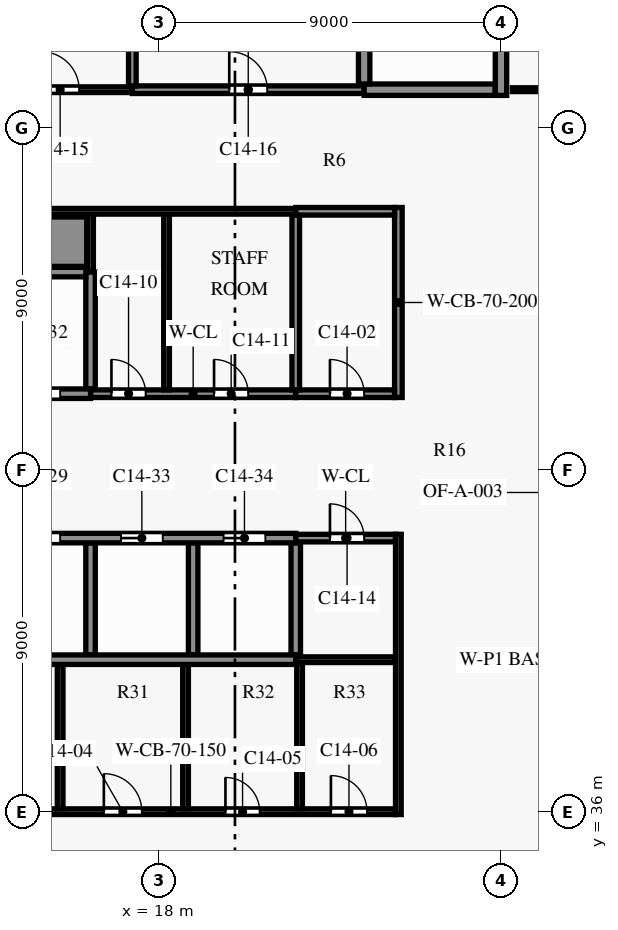
"""IFC4 building model, lengths in metres.
Left out: names, types, materials, properties, quantities, classifications, styles, units other than length and angle.
Written with IfcOpenShell. Run it as: python <this file> out.ifc"""

import sys

from ifc_helpers import new_model, si_unit, direction, frame, frame_2d, origin, place, context, subcontext, project, spatial, rectangle, extrude, element, fill, save


model = new_model("IFC4")
c1 = context("Model", 3, precision=1e-05, world=origin(), true_north=direction((0.0, 1.0)))
c2 = subcontext(c1, "Body", "Model", "MODEL_VIEW")
j1 = project(units=[si_unit("LENGTHUNIT", "METRE"), si_unit("PLANEANGLEUNIT", "RADIAN")], contexts=[c1])
p1 = place(None, origin())
s1 = spatial("IfcSite", under=j1, at=p1, CompositionType="ELEMENT")
p2 = place(p1, origin())
s2 = spatial("IfcBuilding", under=s1, at=p2, CompositionType="ELEMENT")
p3 = place(p2, frame((0.0, 0.0, 92.3)))
s3 = spatial("IfcBuildingStorey", under=s2, at=p3, CompositionType="ELEMENT", Elevation=92.3)
p4 = place(p3, frame((12.4, 36.0, 0.0), z_axis=(0.0, 0.0, 1.0), x_axis=(1.0, 0.0, 0.0)))
e1 = element("IfcWall", 1, at=p4, inside=s3, PredefinedType="SHEAR", context=c2, shape_type="SweptSolid", body=[
    extrude(rectangle(XDim=11.825, YDim=0.15, at=frame_2d((5.913, 0.0))), origin(), (0.0, 0.0, 1.0), 3.5),
])
p5 = place(p4, frame((1.05, 0.0, 0.0)))
e2 = element("IfcOpeningElement", 2, at=p5, cuts=e1, PredefinedType="OPENING", context=c2, shape_type="SweptSolid", body=[
    extrude(rectangle(XDim=0.9, YDim=2.1, at=frame_2d((0.45, 1.05))), frame((0.0, 0.085, 0.0), z_axis=(0.0, -1.0, 0.0), x_axis=(1.0, 0.0, 0.0)), (0.0, 0.0, 1.0), 0.17),
])
p6 = place(p4, frame((4.15, 0.0, 0.0)))
e3 = element("IfcOpeningElement", 3, at=p6, cuts=e1, PredefinedType="OPENING", context=c2, shape_type="SweptSolid", body=[
    extrude(rectangle(XDim=1.0, YDim=2.1, at=frame_2d((0.5, 1.05))), frame((0.0, 0.085, 0.0), z_axis=(0.0, -1.0, 0.0), x_axis=(1.0, 0.0, 0.0)), (0.0, 0.0, 1.0), 0.17),
])
p7 = place(p4, frame((7.35, 0.0, 0.0)))
e4 = element("IfcOpeningElement", 4, at=p7, cuts=e1, PredefinedType="OPENING", context=c2, shape_type="SweptSolid", body=[
    extrude(rectangle(XDim=0.9, YDim=2.1, at=frame_2d((0.45, 1.05))), frame((0.0, 0.085, 0.0), z_axis=(0.0, -1.0, 0.0), x_axis=(1.0, 0.0, 0.0)), (0.0, 0.0, 1.0), 0.17),
])
p8 = place(p4, frame((10.125, 0.0, 0.0)))
e5 = element("IfcOpeningElement", 5, at=p8, cuts=e1, PredefinedType="OPENING", context=c2, shape_type="SweptSolid", body=[
    extrude(rectangle(XDim=0.95, YDim=2.1, at=frame_2d((0.475, 1.05))), frame((0.0, 0.085, 0.0), z_axis=(0.0, -1.0, 0.0), x_axis=(1.0, 0.0, 0.0)), (0.0, 0.0, 1.0), 0.17),
])
p9 = place(p3, frame((21.6, 40.0, 0.0), z_axis=(0.0, 0.0, 1.0), x_axis=(1.0, 0.0, 0.0)))
e6 = element("IfcWall", 6, at=p9, inside=s3, PredefinedType="PARTITIONING", context=c2, shape_type="SweptSolid", body=[
    extrude(rectangle(XDim=2.625, YDim=0.15, at=frame_2d((1.312, 0.0))), origin(), (0.0, 0.0, 1.0), 3.5),
])
p10 = place(p3, frame((8.1, 40.0, 0.0), z_axis=(0.0, 0.0, 1.0), x_axis=(1.0, 0.0, 0.0)))
e7 = element("IfcWall", 7, at=p10, inside=s3, PredefinedType="SHEAR", context=c2, shape_type="SweptSolid", body=[
    extrude(rectangle(XDim=13.5, YDim=0.25, at=frame_2d((6.75, 0.0))), origin(), (0.0, 0.0, 1.0), 3.5),
])
p11 = place(p3, frame((21.6, 43.2, 0.0), z_axis=(0.0, 0.0, 1.0), x_axis=(1.0, 0.0, 0.0)))
e8 = element("IfcWall", 8, at=p11, inside=s3, PredefinedType="PARTITIONING", context=c2, shape_type="SweptSolid", body=[
    extrude(rectangle(XDim=2.625, YDim=0.2, at=frame_2d((1.312, 0.0))), origin(), (0.0, 0.0, 1.0), 3.5),
])
p12 = place(p11, frame((0.9, 0.0, 0.0)))
e9 = element("IfcOpeningElement", 9, at=p12, cuts=e8, PredefinedType="OPENING", context=c2, shape_type="SweptSolid", body=[
    extrude(rectangle(XDim=0.9, YDim=2.1, at=frame_2d((0.45, 1.05))), frame((0.0, 0.11, 0.0), z_axis=(0.0, -1.0, 0.0), x_axis=(1.0, 0.0, 0.0)), (0.0, 0.0, 1.0), 0.22),
])
p13 = place(p3, frame((8.1, 43.2, 0.0), z_axis=(0.0, 0.0, 1.0), x_axis=(1.0, 0.0, 0.0)))
e10 = element("IfcWall", 10, at=p13, inside=s3, PredefinedType="SHEAR", context=c2, shape_type="SweptSolid", body=[
    extrude(rectangle(XDim=13.5, YDim=0.25, at=frame_2d((6.75, 0.0))), origin(), (0.0, 0.0, 1.0), 3.5),
])
p14 = place(p13, frame((0.8, 0.0, 0.0)))
e11 = element("IfcOpeningElement", 11, at=p14, cuts=e10, PredefinedType="OPENING", context=c2, shape_type="SweptSolid", body=[
    extrude(rectangle(XDim=1.1, YDim=2.1, at=frame_2d((0.55, 1.05))), frame((0.0, 0.135, 0.0), z_axis=(0.0, -1.0, 0.0), x_axis=(1.0, 0.0, 0.0)), (0.0, 0.0, 1.0), 0.27),
])
p15 = place(p13, frame((3.5, 0.0, 0.0)))
e12 = element("IfcOpeningElement", 12, at=p15, cuts=e10, PredefinedType="OPENING", context=c2, shape_type="SweptSolid", body=[
    extrude(rectangle(XDim=1.1, YDim=2.1, at=frame_2d((0.55, 1.05))), frame((0.0, 0.135, 0.0), z_axis=(0.0, -1.0, 0.0), x_axis=(1.0, 0.0, 0.0)), (0.0, 0.0, 1.0), 0.27),
])
p16 = place(p13, frame((6.2, 0.0, 0.0)))
e13 = element("IfcOpeningElement", 13, at=p16, cuts=e10, PredefinedType="OPENING", context=c2, shape_type="SweptSolid", body=[
    extrude(rectangle(XDim=1.1, YDim=2.1, at=frame_2d((0.55, 1.05))), frame((0.0, 0.135, 0.0), z_axis=(0.0, -1.0, 0.0), x_axis=(1.0, 0.0, 0.0)), (0.0, 0.0, 1.0), 0.27),
])
p17 = place(p13, frame((8.9, 0.0, 0.0)))
e14 = element("IfcOpeningElement", 14, at=p17, cuts=e10, PredefinedType="OPENING", context=c2, shape_type="SweptSolid", body=[
    extrude(rectangle(XDim=1.1, YDim=2.1, at=frame_2d((0.55, 1.05))), frame((0.0, 0.135, 0.0), z_axis=(0.0, -1.0, 0.0), x_axis=(1.0, 0.0, 0.0)), (0.0, 0.0, 1.0), 0.27),
])
p18 = place(p13, frame((11.6, 0.0, 0.0)))
e15 = element("IfcOpeningElement", 15, at=p18, cuts=e10, PredefinedType="OPENING", context=c2, shape_type="SweptSolid", body=[
    extrude(rectangle(XDim=1.1, YDim=2.1, at=frame_2d((0.55, 1.05))), frame((0.0, 0.135, 0.0), z_axis=(0.0, -1.0, 0.0), x_axis=(1.0, 0.0, 0.0)), (0.0, 0.0, 1.0), 0.27),
])
p19 = place(p3, frame((16.2, 47.0, 0.0), z_axis=(0.0, 0.0, 1.0), x_axis=(1.0, 0.0, 0.0)))
e16 = element("IfcWall", 16, at=p19, inside=s3, PredefinedType="PARTITIONING", context=c2, shape_type="SweptSolid", body=[
    extrude(rectangle(XDim=5.4, YDim=0.2, at=frame_2d((2.7, 0.0))), origin(), (0.0, 0.0, 1.0), 3.5),
])
p20 = place(p19, frame((0.55, 0.0, 0.0)))
e17 = element("IfcOpeningElement", 17, at=p20, cuts=e16, PredefinedType="OPENING", context=c2, shape_type="SweptSolid", body=[
    extrude(rectangle(XDim=0.9, YDim=2.1, at=frame_2d((0.45, 1.05))), frame((0.0, 0.11, 0.0), z_axis=(0.0, -1.0, 0.0), x_axis=(1.0, 0.0, 0.0)), (0.0, 0.0, 1.0), 0.22),
])
p21 = place(p19, frame((3.25, 0.0, 0.0)))
e18 = element("IfcOpeningElement", 18, at=p21, cuts=e16, PredefinedType="OPENING", context=c2, shape_type="SweptSolid", body=[
    extrude(rectangle(XDim=0.9, YDim=2.1, at=frame_2d((0.45, 1.05))), frame((0.0, 0.11, 0.0), z_axis=(0.0, -1.0, 0.0), x_axis=(1.0, 0.0, 0.0)), (0.0, 0.0, 1.0), 0.22),
])
p22 = place(p3, frame((21.6, 47.0, 0.0), z_axis=(0.0, 0.0, 1.0), x_axis=(1.0, 0.0, 0.0)))
e19 = element("IfcWall", 19, at=p22, inside=s3, PredefinedType="PARTITIONING", context=c2, shape_type="SweptSolid", body=[
    extrude(rectangle(XDim=2.6, YDim=0.2, at=frame_2d((1.3, 0.0))), origin(), (0.0, 0.0, 1.0), 3.5),
])
p23 = place(p22, frame((0.9, 0.0, 0.0)))
e20 = element("IfcOpeningElement", 20, at=p23, cuts=e19, PredefinedType="OPENING", context=c2, shape_type="SweptSolid", body=[
    extrude(rectangle(XDim=0.9, YDim=2.1, at=frame_2d((0.45, 1.05))), frame((0.0, 0.11, 0.0), z_axis=(0.0, -1.0, 0.0), x_axis=(1.0, 0.0, 0.0)), (0.0, 0.0, 1.0), 0.22),
])
p24 = place(p3, frame((8.1, 47.0, 0.0), z_axis=(0.0, 0.0, 1.0), x_axis=(1.0, 0.0, 0.0)))
e21 = element("IfcWall", 21, at=p24, inside=s3, PredefinedType="SHEAR", context=c2, shape_type="SweptSolid", body=[
    extrude(rectangle(XDim=8.1, YDim=0.25, at=frame_2d((4.05, 0.0))), origin(), (0.0, 0.0, 1.0), 3.5),
])
p25 = place(p24, frame((0.8, 0.0, 0.0)))
e22 = element("IfcOpeningElement", 22, at=p25, cuts=e21, PredefinedType="OPENING", context=c2, shape_type="SweptSolid", body=[
    extrude(rectangle(XDim=1.1, YDim=2.1, at=frame_2d((0.55, 1.05))), frame((0.0, 0.135, 0.0), z_axis=(0.0, -1.0, 0.0), x_axis=(1.0, 0.0, 0.0)), (0.0, 0.0, 1.0), 0.27),
])
p26 = place(p24, frame((3.5, 0.0, 0.0)))
e23 = element("IfcOpeningElement", 23, at=p26, cuts=e21, PredefinedType="OPENING", context=c2, shape_type="SweptSolid", body=[
    extrude(rectangle(XDim=1.1, YDim=2.1, at=frame_2d((0.55, 1.05))), frame((0.0, 0.135, 0.0), z_axis=(0.0, -1.0, 0.0), x_axis=(1.0, 0.0, 0.0)), (0.0, 0.0, 1.0), 0.27),
])
p27 = place(p24, frame((6.2, 0.0, 0.0)))
e24 = element("IfcOpeningElement", 24, at=p27, cuts=e21, PredefinedType="OPENING", context=c2, shape_type="SweptSolid", body=[
    extrude(rectangle(XDim=1.1, YDim=2.1, at=frame_2d((0.55, 1.05))), frame((0.0, 0.135, 0.0), z_axis=(0.0, -1.0, 0.0), x_axis=(1.0, 0.0, 0.0)), (0.0, 0.0, 1.0), 0.27),
])
p28 = place(p3, frame((8.1, 50.2, 0.0), z_axis=(0.0, 0.0, 1.0), x_axis=(1.0, 0.0, 0.0)))
e25 = element("IfcWall", 25, at=p28, inside=s3, PredefinedType="SHEAR", context=c2, shape_type="SweptSolid", body=[
    extrude(rectangle(XDim=7.975, YDim=0.25, at=frame_2d((3.987, 0.0))), origin(), (0.0, 0.0, 1.0), 3.5),
])
p29 = place(p3, frame((-0.125, 51.0, 0.0), z_axis=(0.0, 0.0, 1.0), x_axis=(1.0, 0.0, 0.0)))
e26 = element("IfcWall", 26, at=p29, inside=s3, PredefinedType="SHEAR", context=c2, shape_type="SweptSolid", body=[
    extrude(rectangle(XDim=16.225, YDim=1.3, at=frame_2d((8.113, 0.0))), origin(), (0.0, 0.0, 1.0), 3.5),
])
p30 = place(p3, frame((8.1, 51.8, 0.0), z_axis=(0.0, 0.0, 1.0), x_axis=(1.0, 0.0, 0.0)))
e27 = element("IfcWall", 27, at=p30, inside=s3, PredefinedType="PARTITIONING", context=c2, shape_type="SweptSolid", body=[
    extrude(rectangle(XDim=13.5, YDim=0.15, at=frame_2d((6.75, 0.0))), origin(), (0.0, 0.0, 1.0), 3.5),
])
p31 = place(p3, frame((21.6, 51.8, 0.0), z_axis=(0.0, 0.0, 1.0), x_axis=(1.0, 0.0, 0.0)))
e28 = element("IfcWall", 28, at=p31, inside=s3, PredefinedType="PARTITIONING", context=c2, shape_type="SweptSolid", body=[
    extrude(rectangle(XDim=2.6, YDim=0.2, at=frame_2d((1.3, 0.0))), origin(), (0.0, 0.0, 1.0), 3.5),
])
p32 = place(p3, frame((13.5, 55.0, 0.0), z_axis=(0.0, 0.0, 1.0), x_axis=(1.0, 0.0, 0.0)))
e29 = element("IfcWall", 29, at=p32, inside=s3, PredefinedType="PARTITIONING", context=c2, shape_type="SweptSolid", body=[
    extrude(rectangle(XDim=3.8, YDim=0.15, at=frame_2d((1.9, 0.0))), origin(), (0.0, 0.0, 1.0), 3.5),
])
p33 = place(p32, frame((1.4, 0.0, 0.0)))
e30 = element("IfcOpeningElement", 30, at=p33, cuts=e29, PredefinedType="OPENING", context=c2, shape_type="SweptSolid", body=[
    extrude(rectangle(XDim=1.0, YDim=2.1, at=frame_2d((0.5, 1.05))), frame((0.0, 0.085, 0.0), z_axis=(0.0, -1.0, 0.0), x_axis=(1.0, 0.0, 0.0)), (0.0, 0.0, 1.0), 0.17),
])
p34 = place(p3, frame((17.3, 55.0, 0.0), z_axis=(0.0, 0.0, 1.0), x_axis=(1.0, 0.0, 0.0)))
e31 = element("IfcWall", 31, at=p34, inside=s3, PredefinedType="PARTITIONING", context=c2, shape_type="SweptSolid", body=[
    extrude(rectangle(XDim=6.1, YDim=0.2, at=frame_2d((3.05, 0.0))), origin(), (0.0, 0.0, 1.0), 3.5),
])
p35 = place(p34, frame((2.55, 0.0, 0.0)))
e32 = element("IfcOpeningElement", 32, at=p35, cuts=e31, PredefinedType="OPENING", context=c2, shape_type="SweptSolid", body=[
    extrude(rectangle(XDim=1.0, YDim=2.1, at=frame_2d((0.5, 1.05))), frame((0.0, 0.11, 0.0), z_axis=(0.0, -1.0, 0.0), x_axis=(1.0, 0.0, 0.0)), (0.0, 0.0, 1.0), 0.22),
])
p36 = place(p3, frame((23.4, 55.0, 0.0), z_axis=(0.0, 0.0, 1.0), x_axis=(1.0, 0.0, 0.0)))
e33 = element("IfcWall", 33, at=p36, inside=s3, PredefinedType="SHEAR", context=c2, shape_type="SweptSolid", body=[
    extrude(rectangle(XDim=3.45, YDim=0.3, at=frame_2d((1.725, 0.0))), origin(), (0.0, 0.0, 1.0), 3.5),
])
p37 = place(p3, frame((15.4, 36.075, 0.0), z_axis=(0.0, 0.0, 1.0), x_axis=(0.0, 1.0, 0.0)))
e34 = element("IfcWall", 34, at=p37, inside=s3, PredefinedType="PARTITIONING", context=c2, shape_type="SweptSolid", body=[
    extrude(rectangle(XDim=3.8, YDim=0.15, at=frame_2d((1.9, 0.0))), origin(), (0.0, 0.0, 1.0), 3.5),
])
p38 = place(p3, frame((16.2, 50.2, 0.0), z_axis=(0.0, 0.0, 1.0), x_axis=(0.0, 1.0, 0.0)))
e35 = element("IfcWall", 35, at=p38, inside=s3, PredefinedType="PARTITIONING", context=c2, shape_type="SweptSolid", body=[
    extrude(rectangle(XDim=1.525, YDim=0.15, at=frame_2d((0.763, 0.0))), origin(), (0.0, 0.0, 1.0), 3.5),
])
p39 = place(p3, frame((16.2, 40.125, 0.0), z_axis=(0.0, 0.0, 1.0), x_axis=(0.0, 1.0, 0.0)))
e36 = element("IfcWall", 36, at=p39, inside=s3, PredefinedType="SHEAR", context=c2, shape_type="SweptSolid", body=[
    extrude(rectangle(XDim=2.95, YDim=0.25, at=frame_2d((1.475, 0.0))), origin(), (0.0, 0.0, 1.0), 3.5),
])
p40 = place(p3, frame((16.2, 47.125, 0.0), z_axis=(0.0, 0.0, 1.0), x_axis=(0.0, 1.0, 0.0)))
e37 = element("IfcWall", 37, at=p40, inside=s3, PredefinedType="SHEAR", context=c2, shape_type="SweptSolid", body=[
    extrude(rectangle(XDim=3.075, YDim=0.25, at=frame_2d((1.538, 0.0))), origin(), (0.0, 0.0, 1.0), 3.5),
])
p41 = place(p3, frame((17.3, 55.1, 0.0), z_axis=(0.0, 0.0, 1.0), x_axis=(0.0, 1.0, 0.0)))
e38 = element("IfcWall", 38, at=p41, inside=s3, PredefinedType="PARTITIONING", context=c2, shape_type="SweptSolid", body=[
    extrude(rectangle(XDim=7.05, YDim=0.2, at=frame_2d((3.525, 0.0))), origin(), (0.0, 0.0, 1.0), 3.5),
])
p42 = place(p3, frame((18.2, 47.1, 0.0), z_axis=(0.0, 0.0, 1.0), x_axis=(0.0, 1.0, 0.0)))
e39 = element("IfcWall", 39, at=p42, inside=s3, PredefinedType="PARTITIONING", context=c2, shape_type="SweptSolid", body=[
    extrude(rectangle(XDim=4.625, YDim=0.15, at=frame_2d((2.312, 0.0))), origin(), (0.0, 0.0, 1.0), 3.5),
])
p43 = place(p3, frame((18.7, 36.075, 0.0), z_axis=(0.0, 0.0, 1.0), x_axis=(0.0, 1.0, 0.0)))
e40 = element("IfcWall", 40, at=p43, inside=s3, PredefinedType="PARTITIONING", context=c2, shape_type="SweptSolid", body=[
    extrude(rectangle(XDim=3.8, YDim=0.15, at=frame_2d((1.9, 0.0))), origin(), (0.0, 0.0, 1.0), 3.5),
])
p44 = place(p3, frame((18.9, 40.125, 0.0), z_axis=(0.0, 0.0, 1.0), x_axis=(0.0, 1.0, 0.0)))
e41 = element("IfcWall", 41, at=p44, inside=s3, PredefinedType="SHEAR", context=c2, shape_type="SweptSolid", body=[
    extrude(rectangle(XDim=2.95, YDim=0.25, at=frame_2d((1.475, 0.0))), origin(), (0.0, 0.0, 1.0), 3.5),
])
p45 = place(p3, frame((21.6, 47.1, 0.0), z_axis=(0.0, 0.0, 1.0), x_axis=(0.0, 1.0, 0.0)))
e42 = element("IfcWall", 42, at=p45, inside=s3, PredefinedType="PARTITIONING", context=c2, shape_type="SweptSolid", body=[
    extrude(rectangle(XDim=4.6, YDim=0.2, at=frame_2d((2.3, 0.0))), origin(), (0.0, 0.0, 1.0), 3.5),
])
p46 = place(p3, frame((21.6, 40.125, 0.0), z_axis=(0.0, 0.0, 1.0), x_axis=(0.0, 1.0, 0.0)))
e43 = element("IfcWall", 43, at=p46, inside=s3, PredefinedType="SHEAR", context=c2, shape_type="SweptSolid", body=[
    extrude(rectangle(XDim=2.95, YDim=0.25, at=frame_2d((1.475, 0.0))), origin(), (0.0, 0.0, 1.0), 3.5),
])
p47 = place(p3, frame((21.7, 36.075, 0.0), z_axis=(0.0, 0.0, 1.0), x_axis=(0.0, 1.0, 0.0)))
e44 = element("IfcWall", 44, at=p47, inside=s3, PredefinedType="PARTITIONING", context=c2, shape_type="SweptSolid", body=[
    extrude(rectangle(XDim=3.85, YDim=0.15, at=frame_2d((1.925, 0.0))), origin(), (0.0, 0.0, 1.0), 3.5),
])
p48 = place(p3, frame((23.4, 55.15, 0.0), z_axis=(0.0, 0.0, 1.0), x_axis=(0.0, 1.0, 0.0)))
e45 = element("IfcWall", 45, at=p48, inside=s3, PredefinedType="SHEAR", context=c2, shape_type="SweptSolid", body=[
    extrude(rectangle(XDim=8.0, YDim=0.3, at=frame_2d((4.0, 0.0))), origin(), (0.0, 0.0, 1.0), 3.5),
])
p49 = place(p3, frame((24.3, 35.925, 0.0), z_axis=(0.0, 0.0, 1.0), x_axis=(0.0, 1.0, 0.0)))
e46 = element("IfcWall", 46, at=p49, inside=s3, PredefinedType="PARTITIONING", context=c2, shape_type="SweptSolid", body=[
    extrude(rectangle(XDim=7.375, YDim=0.15, at=frame_2d((3.688, 0.0))), origin(), (0.0, 0.0, 1.0), 3.5),
])
p50 = place(p3, frame((24.3, 46.9, 0.0), z_axis=(0.0, 0.0, 1.0), x_axis=(0.0, 1.0, 0.0)))
e47 = element("IfcWall", 47, at=p50, inside=s3, PredefinedType="SHEAR", context=c2, shape_type="SweptSolid", body=[
    extrude(rectangle(XDim=5.0, YDim=0.2, at=frame_2d((2.5, 0.0))), origin(), (0.0, 0.0, 1.0), 3.5),
])
p51 = place(p3, frame((27.0, 54.85, 0.0), z_axis=(0.0, 0.0, 1.0), x_axis=(0.0, 1.0, 0.0)))
e48 = element("IfcWall", 48, at=p51, inside=s3, PredefinedType="SHEAR", context=c2, shape_type="SweptSolid", body=[
    extrude(rectangle(XDim=8.45, YDim=0.3, at=frame_2d((4.225, 0.0))), origin(), (0.0, 0.0, 1.0), 3.5),
])
p52 = place(p51, frame((6.55, 0.0, 0.0)))
e49 = element("IfcOpeningElement", 49, at=p52, cuts=e48, PredefinedType="OPENING", context=c2, shape_type="SweptSolid", body=[
    extrude(rectangle(XDim=1.2, YDim=2.2, at=frame_2d((0.6, 1.1))), frame((0.0, 0.16, 0.0), z_axis=(0.0, -1.0, 0.0), x_axis=(1.0, 0.0, 0.0)), (0.0, 0.0, 1.0), 0.32),
])
p53 = place(p3, frame((27.3, 55.0, 0.0), z_axis=(0.0, 0.0, 1.0), x_axis=(1.0, 0.0, 0.0)))
e50 = element("IfcWall", 50, at=p53, inside=s3, PredefinedType="PARTITIONING", context=c2, shape_type="SweptSolid", body=[
    extrude(rectangle(XDim=3.25, YDim=0.1, at=frame_2d((1.625, 0.0))), origin(), (0.0, 0.0, 1.0), 3.48),
])
p54 = place(p23, origin())
e51 = element("IfcDoor", 51, at=p54, inside=s3, OperationType="SINGLE_SWING_LEFT", PredefinedType="DOOR", context=c2, shape_type="SweptSolid", body=[
    extrude(rectangle(XDim=0.9, YDim=2.1, at=frame_2d((0.45, 1.05))), frame((0.0, 0.025, 0.0), z_axis=(0.0, -1.0, 0.0), x_axis=(1.0, 0.0, 0.0)), (0.0, 0.0, 1.0), 0.05),
])
fill(e20, e51)
p55 = place(p6, origin())
e52 = element("IfcDoor", 52, at=p55, inside=s3, OperationType="SINGLE_SWING_LEFT", PredefinedType="DOOR", context=c2, shape_type="SweptSolid", body=[
    extrude(rectangle(XDim=1.0, YDim=2.1, at=frame_2d((0.5, 1.05))), frame((0.0, 0.025, 0.0), z_axis=(0.0, -1.0, 0.0), x_axis=(1.0, 0.0, 0.0)), (0.0, 0.0, 1.0), 0.05),
])
fill(e3, e52)
p56 = place(p7, origin())
e53 = element("IfcDoor", 53, at=p56, inside=s3, OperationType="SINGLE_SWING_RIGHT", PredefinedType="DOOR", context=c2, shape_type="SweptSolid", body=[
    extrude(rectangle(XDim=0.9, YDim=2.1, at=frame_2d((0.45, 1.05))), frame((0.0, 0.025, 0.0), z_axis=(0.0, -1.0, 0.0), x_axis=(1.0, 0.0, 0.0)), (0.0, 0.0, 1.0), 0.05),
])
fill(e4, e53)
p57 = place(p8, origin())
e54 = element("IfcDoor", 54, at=p57, inside=s3, OperationType="SINGLE_SWING_LEFT", PredefinedType="DOOR", context=c2, shape_type="SweptSolid", body=[
    extrude(rectangle(XDim=0.95, YDim=2.1, at=frame_2d((0.475, 1.05))), frame((0.0, 0.025, 0.0), z_axis=(0.0, -1.0, 0.0), x_axis=(1.0, 0.0, 0.0)), (0.0, 0.0, 1.0), 0.05),
])
fill(e5, e54)
p58 = place(p20, origin())
e55 = element("IfcDoor", 55, at=p58, inside=s3, OperationType="SINGLE_SWING_LEFT", PredefinedType="DOOR", context=c2, shape_type="SweptSolid", body=[
    extrude(rectangle(XDim=0.9, YDim=2.1, at=frame_2d((0.45, 1.05))), frame((0.0, 0.025, 0.0), z_axis=(0.0, -1.0, 0.0), x_axis=(1.0, 0.0, 0.0)), (0.0, 0.0, 1.0), 0.05),
])
fill(e17, e55)
p59 = place(p21, origin())
e56 = element("IfcDoor", 56, at=p59, inside=s3, OperationType="SINGLE_SWING_RIGHT", PredefinedType="DOOR", context=c2, shape_type="SweptSolid", body=[
    extrude(rectangle(XDim=0.9, YDim=2.1, at=frame_2d((0.45, 1.05))), frame((0.0, 0.025, 0.0), z_axis=(0.0, -1.0, 0.0), x_axis=(1.0, 0.0, 0.0)), (0.0, 0.0, 1.0), 0.05),
])
fill(e18, e56)
p60 = place(p12, origin())
e57 = element("IfcDoor", 57, at=p60, inside=s3, OperationType="SINGLE_SWING_RIGHT", PredefinedType="DOOR", context=c2, shape_type="SweptSolid", body=[
    extrude(rectangle(XDim=0.9, YDim=2.1, at=frame_2d((0.45, 1.05))), frame((0.0, 0.025, 0.0), z_axis=(0.0, -1.0, 0.0), x_axis=(1.0, 0.0, 0.0)), (0.0, 0.0, 1.0), 0.05),
])
fill(e9, e57)
p61 = place(p33, origin())
e58 = element("IfcDoor", 58, at=p61, inside=s3, OperationType="SINGLE_SWING_LEFT", PredefinedType="DOOR", context=c2, shape_type="SweptSolid", body=[
    extrude(rectangle(XDim=1.0, YDim=2.1, at=frame_2d((0.5, 1.05))), frame((0.0, 0.025, 0.0), z_axis=(0.0, -1.0, 0.0), x_axis=(1.0, 0.0, 0.0)), (0.0, 0.0, 1.0), 0.05),
])
fill(e30, e58)
p62 = place(p35, origin())
e59 = element("IfcDoor", 59, at=p62, inside=s3, OperationType="SINGLE_SWING_RIGHT", PredefinedType="DOOR", context=c2, shape_type="SweptSolid", body=[
    extrude(rectangle(XDim=1.0, YDim=2.1, at=frame_2d((0.5, 1.05))), frame((0.0, 0.025, 0.0), z_axis=(0.0, -1.0, 0.0), x_axis=(1.0, 0.0, 0.0)), (0.0, 0.0, 1.0), 0.05),
])
fill(e32, e59)
p63 = place(p16, origin())
e60 = element("IfcDoor", 60, at=p63, inside=s3, OperationType="DOUBLE_DOOR_SLIDING", PredefinedType="DOOR", context=c2, shape_type="SweptSolid", body=[
    extrude(rectangle(XDim=1.1, YDim=2.1, at=frame_2d((0.55, 1.05))), frame((0.0, 0.025, 0.0), z_axis=(0.0, -1.0, 0.0), x_axis=(1.0, 0.0, 0.0)), (0.0, 0.0, 1.0), 0.05),
])
fill(e13, e60)
p64 = place(p27, origin())
e61 = element("IfcDoor", 61, at=p64, inside=s3, OperationType="DOUBLE_DOOR_SLIDING", PredefinedType="DOOR", context=c2, shape_type="SweptSolid", body=[
    extrude(rectangle(XDim=1.1, YDim=2.1, at=frame_2d((0.55, 1.05))), frame((0.0, 0.025, 0.0), z_axis=(0.0, -1.0, 0.0), x_axis=(1.0, 0.0, 0.0)), (0.0, 0.0, 1.0), 0.05),
])
fill(e24, e61)
p65 = place(p17, origin())
e62 = element("IfcDoor", 62, at=p65, inside=s3, OperationType="DOUBLE_DOOR_SLIDING", PredefinedType="DOOR", context=c2, shape_type="SweptSolid", body=[
    extrude(rectangle(XDim=1.1, YDim=2.1, at=frame_2d((0.55, 1.05))), frame((0.0, 0.025, 0.0), z_axis=(0.0, -1.0, 0.0), x_axis=(1.0, 0.0, 0.0)), (0.0, 0.0, 1.0), 0.05),
])
fill(e14, e62)
p66 = place(p18, origin())
e63 = element("IfcDoor", 63, at=p66, inside=s3, OperationType="DOUBLE_DOOR_SLIDING", PredefinedType="DOOR", context=c2, shape_type="SweptSolid", body=[
    extrude(rectangle(XDim=1.1, YDim=2.1, at=frame_2d((0.55, 1.05))), frame((0.0, 0.025, 0.0), z_axis=(0.0, -1.0, 0.0), x_axis=(1.0, 0.0, 0.0)), (0.0, 0.0, 1.0), 0.05),
])
fill(e15, e63)
save(model, sys.argv[1])
